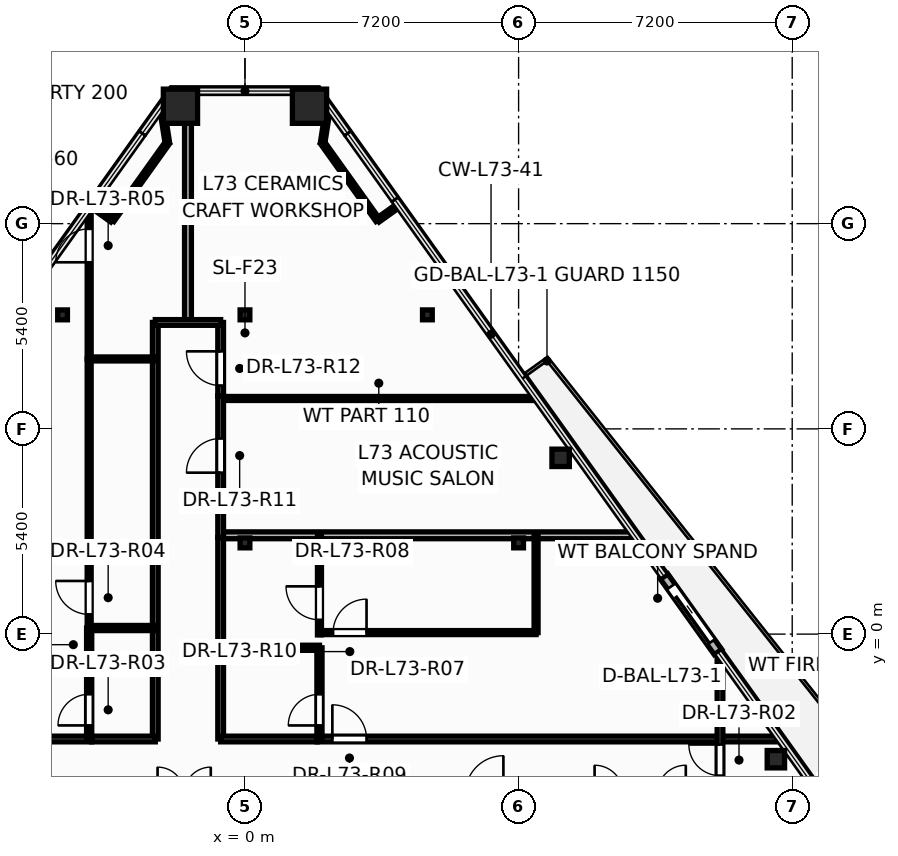
"""IFC4 building model, lengths in metres.
Left out: names, types, materials, properties, quantities, classifications, styles, units other than length and angle.
Written with IfcOpenShell. Run it as: python <this file> out.ifc"""

import sys

from ifc_helpers import new_model, si_unit, direction, frame, frame_2d, origin, origin_2d, place, context, subcontext, project, spatial, rectangle, hollow_rectangle, hollow_circle, i_section, extrude, element, fill, save


model = new_model("IFC4")
c1 = context("Model", 3, precision=1e-05, world=origin(), true_north=direction((0.0, 1.0)))
c2 = subcontext(c1, "Body", "Model", "MODEL_VIEW")
j1 = project(units=[si_unit("LENGTHUNIT", "METRE"), si_unit("PLANEANGLEUNIT", "RADIAN")], contexts=[c1])
p1 = place(None, origin())
s1 = spatial("IfcSite", under=j1, at=p1, CompositionType="ELEMENT")
p2 = place(p1, origin())
s2 = spatial("IfcBuilding", under=s1, at=p2, CompositionType="ELEMENT")
p3 = place(p2, frame((0.0, 0.0, 277.8)))
s3 = spatial("IfcBuildingStorey", under=s2, at=p3, CompositionType="ELEMENT", Elevation=277.8)
for number, where, z_axis, x_axis in (
    (1, (1.698, 13.889, 0.0), (0.0, 0.0, 1.0), (1.0, 0.0, 0.0)),
    (2, (-1.698, 13.889, 0.0), (0.0, 0.0, 1.0), (1.0, 0.0, 0.0)),
):
    element("IfcColumn", number, at=place(p3, frame(where, z_axis=z_axis, x_axis=x_axis)), inside=s3, PredefinedType="COLUMN", context=c2, shape_type="SweptSolid", body=[
        extrude(hollow_rectangle(XDim=0.9, YDim=0.9, WallThickness=0.04, at=origin_2d()), origin(), (0.0, 0.0, 1.0), 3.6),
    ])
for number, where, z_axis, x_axis in (
    (3, (13.97, -3.292, 0.0), (0.0, 0.0, 1.0), (1.0, 0.0, 0.0)),
    (4, (8.306, 4.638, 0.0), (0.0, 0.0, 1.0), (1.0, 0.0, 0.0)),
):
    element("IfcColumn", number, at=place(p3, frame(where, z_axis=z_axis, x_axis=x_axis)), inside=s3, PredefinedType="COLUMN", context=c2, shape_type="SweptSolid", body=[
        extrude(hollow_circle(Radius=0.229, WallThickness=0.016, at=origin_2d()), origin(), (0.0, 0.0, 1.0), 3.6),
    ])
for number, where, z_axis, x_axis in (
    (5, (0.0, 2.4, 0.0), (0.0, 0.0, 1.0), (1.0, 0.0, 0.0)),
    (6, (7.2, 2.4, 0.0), (0.0, 0.0, 1.0), (1.0, 0.0, 0.0)),
    (7, (-4.8, 8.4, 0.0), (0.0, 0.0, 1.0), (1.0, 0.0, 0.0)),
    (8, (0.0, 8.4, 0.0), (0.0, 0.0, 1.0), (1.0, 0.0, 0.0)),
    (9, (4.8, 8.4, 0.0), (0.0, 0.0, 1.0), (1.0, 0.0, 0.0)),
):
    element("IfcColumn", number, at=place(p3, frame(where, z_axis=z_axis, x_axis=x_axis)), inside=s3, PredefinedType="COLUMN", context=c2, shape_type="SweptSolid", body=[
        extrude(i_section(OverallWidth=0.256, OverallDepth=0.26, WebThickness=0.01, FlangeThickness=0.017, at=origin_2d()), origin(), (0.0, 0.0, 1.0), 3.6),
    ])
p4 = place(p3, frame((12.447, -0.471, -0.015), z_axis=(0.0, 0.0, 1.0), x_axis=(-0.581219264245, 0.813746991927, 0.0)))
e10 = element("IfcWall", 10, at=p4, inside=s3, PredefinedType="STANDARD", context=c2, shape_type="SweptSolid", body=[
    extrude(rectangle(XDim=2.44, YDim=0.24, at=frame_2d((1.22, 0.0))), origin(), (0.0, 0.0, 1.0), 2.878),
])
p5 = place(p4, frame((0.32, 0.0, 0.015)))
e11 = element("IfcOpeningElement", 11, at=p5, cuts=e10, PredefinedType="OPENING", context=c2, shape_type="SweptSolid", body=[
    extrude(rectangle(XDim=1.806, YDim=2.204, at=frame_2d((0.9, 1.102))), frame((0.0, 0.13, 0.0), z_axis=(0.0, -1.0, 0.0), x_axis=(1.0, 0.0, 0.0)), (0.0, 0.0, 1.0), 0.26),
])
p6 = place(p3, frame((1.9, -2.76, 0.0), z_axis=(0.0, 0.0, 1.0), x_axis=(1.0, 0.0, 0.0)))
e12 = element("IfcWall", 12, at=p6, inside=s3, PredefinedType="PARTITIONING", context=c2, shape_type="SweptSolid", body=[
    extrude(rectangle(XDim=12.182, YDim=0.15, at=frame_2d((6.091, 0.0))), origin(), (0.0, 0.0, 1.0), 2.32),
])
p7 = place(p6, frame((0.399, 0.0, 0.0)))
e13 = element("IfcOpeningElement", 13, at=p7, cuts=e12, PredefinedType="OPENING", context=c2, shape_type="SweptSolid", body=[
    extrude(rectangle(XDim=0.906, YDim=2.104, at=frame_2d((0.45, 1.052))), frame((0.0, 0.085, 0.0), z_axis=(0.0, -1.0, 0.0), x_axis=(1.0, 0.0, 0.0)), (0.0, 0.0, 1.0), 0.17),
])
p8 = place(p3, frame((-14.082, -2.76, 0.0), z_axis=(0.0, 0.0, 1.0), x_axis=(1.0, 0.0, 0.0)))
e14 = element("IfcWall", 14, at=p8, inside=s3, PredefinedType="PARTITIONING", context=c2, shape_type="SweptSolid", body=[
    extrude(rectangle(XDim=10.042, YDim=0.15, at=frame_2d((5.021, 0.0))), origin(), (0.0, 0.0, 1.0), 2.32),
])
p9 = place(p8, frame((3.214, 0.0, 0.0)))
e15 = element("IfcOpeningElement", 15, at=p9, cuts=e14, PredefinedType="OPENING", context=c2, shape_type="SweptSolid", body=[
    extrude(rectangle(XDim=0.906, YDim=2.104, at=frame_2d((0.45, 1.052))), frame((0.0, 0.085, 0.0), z_axis=(0.0, -1.0, 0.0), x_axis=(1.0, 0.0, 0.0)), (0.0, 0.0, 1.0), 0.17),
])
p10 = place(p3, frame((-0.64, 6.2, 0.0), z_axis=(0.0, 0.0, 1.0), x_axis=(1.0, 0.0, 0.0)))
e16 = element("IfcWall", 16, at=p10, inside=s3, PredefinedType="PARTITIONING", context=c2, shape_type="SweptSolid", body=[
    extrude(rectangle(XDim=8.322, YDim=0.105, at=frame_2d((4.161, 0.0))), origin(), (0.0, 0.0, 1.0), 2.32),
])
p11 = place(p3, frame((-2.36, -2.76, 0.0), z_axis=(0.0, 0.0, 1.0), x_axis=(0.0, 1.0, 0.0)))
e17 = element("IfcWall", 17, at=p11, inside=s3, PredefinedType="PARTITIONING", context=c2, shape_type="SweptSolid", body=[
    extrude(rectangle(XDim=10.96, YDim=0.15, at=frame_2d((5.48, 0.0))), origin(), (0.0, 0.0, 1.0), 2.32),
])
p12 = place(p3, frame((-4.1, 0.16, 0.0), z_axis=(0.0, 0.0, 1.0), x_axis=(0.0, 1.0, 0.0)))
e18 = element("IfcWall", 18, at=p12, inside=s3, PredefinedType="PARTITIONING", context=c2, shape_type="SweptSolid", body=[
    extrude(rectangle(XDim=7.08, YDim=0.105, at=frame_2d((3.54, 0.0))), origin(), (0.0, 0.0, 1.0), 2.32),
])
p13 = place(p12, frame((0.358, 0.0, 0.0)))
e19 = element("IfcOpeningElement", 19, at=p13, cuts=e18, PredefinedType="OPENING", context=c2, shape_type="SweptSolid", body=[
    extrude(rectangle(XDim=0.886, YDim=2.104, at=frame_2d((0.44, 1.052))), frame((0.0, 0.062, 0.0), z_axis=(0.0, -1.0, 0.0), x_axis=(1.0, 0.0, 0.0)), (0.0, 0.0, 1.0), 0.125),
])
p14 = place(p3, frame((-1.5, 8.2, 0.0), z_axis=(0.0, 0.0, 1.0), x_axis=(0.0, 1.0, 0.0)))
e20 = element("IfcWall", 20, at=p14, inside=s3, PredefinedType="PARTITIONING", context=c2, shape_type="SweptSolid", body=[
    extrude(rectangle(XDim=6.09, YDim=0.18, at=frame_2d((3.045, 0.0))), origin(), (0.0, 0.0, 1.0), 2.718),
])
p15 = place(p3, frame((1.96, 0.04, 0.0), z_axis=(0.0, 0.0, 1.0), x_axis=(1.0, 0.0, 0.0)))
e21 = element("IfcWall", 21, at=p15, inside=s3, PredefinedType="PARTITIONING", context=c2, shape_type="SweptSolid", body=[
    extrude(rectangle(XDim=5.7, YDim=0.105, at=frame_2d((2.85, 0.0))), origin(), (0.0, 0.0, 1.0), 2.32),
])
p16 = place(p15, frame((0.359, 0.0, 0.0)))
e22 = element("IfcOpeningElement", 22, at=p16, cuts=e21, PredefinedType="OPENING", context=c2, shape_type="SweptSolid", body=[
    extrude(rectangle(XDim=0.886, YDim=2.104, at=frame_2d((0.44, 1.052))), frame((0.0, 0.062, 0.0), z_axis=(0.0, -1.0, 0.0), x_axis=(1.0, 0.0, 0.0)), (0.0, 0.0, 1.0), 0.125),
])
p17 = place(p3, frame((-0.64, 2.6, 0.0), z_axis=(0.0, 0.0, 1.0), x_axis=(1.0, 0.0, 0.0)))
e23 = element("IfcWall", 23, at=p17, inside=s3, PredefinedType="PARTITIONING", context=c2, shape_type="SweptSolid", body=[
    extrude(rectangle(XDim=10.894, YDim=0.18, at=frame_2d((5.447, 0.0))), origin(), (0.0, 0.0, 1.0), 2.32),
])
p18 = place(p3, frame((-4.1, 7.24, 0.0), z_axis=(0.0, 0.0, 1.0), x_axis=(0.0, 1.0, 0.0)))
e24 = element("IfcWall", 24, at=p18, inside=s3, PredefinedType="PARTITIONING", context=c2, shape_type="SweptSolid", body=[
    extrude(rectangle(XDim=4.24, YDim=0.105, at=frame_2d((2.12, 0.0))), origin(), (0.0, 0.0, 1.0), 2.718),
])
p19 = place(p18, frame((2.543, 0.0, 0.0)))
e25 = element("IfcOpeningElement", 25, at=p19, cuts=e24, PredefinedType="OPENING", context=c2, shape_type="SweptSolid", body=[
    extrude(rectangle(XDim=0.886, YDim=2.104, at=frame_2d((0.44, 1.052))), frame((0.0, 0.062, 0.0), z_axis=(0.0, -1.0, 0.0), x_axis=(1.0, 0.0, 0.0)), (0.0, 0.0, 1.0), 0.125),
])
p20 = place(p3, frame((-0.64, 2.54, 0.0), z_axis=(0.0, 0.0, 1.0), x_axis=(0.0, 1.0, 0.0)))
e26 = element("IfcWall", 26, at=p20, inside=s3, PredefinedType="PARTITIONING", context=c2, shape_type="SweptSolid", body=[
    extrude(rectangle(XDim=3.72, YDim=0.15, at=frame_2d((1.86, 0.0))), origin(), (0.0, 0.0, 1.0), 2.32),
])
p21 = place(p20, frame((1.708, 0.0, 0.0)))
e27 = element("IfcOpeningElement", 27, at=p21, cuts=e26, PredefinedType="OPENING", context=c2, shape_type="SweptSolid", body=[
    extrude(rectangle(XDim=0.906, YDim=2.104, at=frame_2d((0.45, 1.052))), frame((0.0, 0.085, 0.0), z_axis=(0.0, -1.0, 0.0), x_axis=(1.0, 0.0, 0.0)), (0.0, 0.0, 1.0), 0.17),
])
p22 = place(p3, frame((12.5, -4.24, 0.0), z_axis=(0.0, 0.0, 1.0), x_axis=(0.0, 1.0, 0.0)))
e28 = element("IfcWall", 28, at=p22, inside=s3, PredefinedType="PARTITIONING", context=c2, shape_type="SweptSolid", body=[
    extrude(rectangle(XDim=3.695, YDim=0.15, at=frame_2d((1.848, 0.0))), origin(), (0.0, 0.0, 1.0), 2.32),
])
p23 = place(p22, frame((0.516, 0.0, 0.0)))
e29 = element("IfcOpeningElement", 29, at=p23, cuts=e28, PredefinedType="OPENING", context=c2, shape_type="SweptSolid", body=[
    extrude(rectangle(XDim=0.826, YDim=2.104, at=frame_2d((0.41, 1.052))), frame((0.0, 0.085, 0.0), z_axis=(0.0, -1.0, 0.0), x_axis=(1.0, 0.0, 0.0)), (0.0, 0.0, 1.0), 0.17),
])
p24 = place(p3, frame((-0.64, -2.76, 0.0), z_axis=(0.0, 0.0, 1.0), x_axis=(0.0, 1.0, 0.0)))
e30 = element("IfcWall", 30, at=p24, inside=s3, PredefinedType="PARTITIONING", context=c2, shape_type="SweptSolid", body=[
    extrude(rectangle(XDim=5.298, YDim=0.15, at=frame_2d((2.649, 0.0))), origin(), (0.0, 0.0, 1.0), 2.32),
])
p25 = place(p3, frame((-4.1, -2.76, 0.0), z_axis=(0.0, 0.0, 1.0), x_axis=(0.0, 1.0, 0.0)))
e31 = element("IfcWall", 31, at=p25, inside=s3, PredefinedType="PARTITIONING", context=c2, shape_type="SweptSolid", body=[
    extrude(rectangle(XDim=2.92, YDim=0.135, at=frame_2d((1.46, 0.0))), origin(), (0.0, 0.0, 1.0), 3.345),
])
p26 = place(p25, frame((0.357, 0.0, 0.0)))
e32 = element("IfcOpeningElement", 32, at=p26, cuts=e31, PredefinedType="OPENING", context=c2, shape_type="SweptSolid", body=[
    extrude(rectangle(XDim=0.826, YDim=2.104, at=frame_2d((0.41, 1.052))), frame((0.0, 0.078, 0.0), z_axis=(0.0, -1.0, 0.0), x_axis=(1.0, 0.0, 0.0)), (0.0, 0.0, 1.0), 0.155),
])
p27 = place(p3, frame((-0.64, -2.76, 0.0), z_axis=(0.0, 0.0, 1.0), x_axis=(1.0, 0.0, 0.0)))
e33 = element("IfcWall", 33, at=p27, inside=s3, PredefinedType="PARTITIONING", context=c2, shape_type="SweptSolid", body=[
    extrude(rectangle(XDim=2.538, YDim=0.15, at=frame_2d((1.269, 0.0))), origin(), (0.0, 0.0, 1.0), 2.32),
])
p28 = place(p3, frame((1.96, -0.02, 0.0), z_axis=(0.0, 0.0, 1.0), x_axis=(0.0, 1.0, 0.0)))
e34 = element("IfcWall", 34, at=p28, inside=s3, PredefinedType="PARTITIONING", context=c2, shape_type="SweptSolid", body=[
    extrude(rectangle(XDim=2.62, YDim=0.105, at=frame_2d((1.31, 0.0))), origin(), (0.0, 0.0, 1.0), 2.32),
])
p29 = place(p28, frame((0.396, 0.0, 0.0)))
e35 = element("IfcOpeningElement", 35, at=p29, cuts=e34, PredefinedType="OPENING", context=c2, shape_type="SweptSolid", body=[
    extrude(rectangle(XDim=0.886, YDim=2.104, at=frame_2d((0.44, 1.052))), frame((0.0, 0.062, 0.0), z_axis=(0.0, -1.0, 0.0), x_axis=(1.0, 0.0, 0.0)), (0.0, 0.0, 1.0), 0.125),
])
p30 = place(p3, frame((-0.64, -0.36, 0.0), z_axis=(0.0, 0.0, 1.0), x_axis=(1.0, 0.0, 0.0)))
e36 = element("IfcWall", 36, at=p30, inside=s3, PredefinedType="PARTITIONING", context=c2, shape_type="SweptSolid", body=[
    extrude(rectangle(XDim=2.6, YDim=0.135, at=frame_2d((1.3, 0.0))), origin(), (0.0, 0.0, 1.0), 2.32),
])
p31 = place(p3, frame((7.66, 0.04, 0.0), z_axis=(0.0, 0.0, 1.0), x_axis=(0.0, 1.0, 0.0)))
e37 = element("IfcWall", 37, at=p31, inside=s3, PredefinedType="PARTITIONING", context=c2, shape_type="SweptSolid", body=[
    extrude(rectangle(XDim=2.56, YDim=0.105, at=frame_2d((1.28, 0.0))), origin(), (0.0, 0.0, 1.0), 2.718),
])
for number, where, z_axis, x_axis in (
    (38, (-2.043, 12.925, 0.0), (0.0, 0.0, 1.0), (-0.581, -0.814, 0.0)),
    (39, (3.495, 10.892, 0.0), (0.0, 0.0, 1.0), (-0.581, 0.814, 0.0)),
):
    element("IfcWall", number, at=place(p3, frame(where, z_axis=z_axis, x_axis=x_axis)), inside=s3, PredefinedType="PARTITIONING", context=c2, shape_type="SweptSolid", body=[
        extrude(rectangle(XDim=2.498, YDim=0.12, at=frame_2d((1.249, 0.0))), origin(), (0.0, 0.0, 1.0), 2.718),
    ])
p32 = place(p3, frame((1.96, -2.76, 0.0), z_axis=(0.0, 0.0, 1.0), x_axis=(0.0, 1.0, 0.0)))
e40 = element("IfcWall", 40, at=p32, inside=s3, PredefinedType="PARTITIONING", context=c2, shape_type="SweptSolid", body=[
    extrude(rectangle(XDim=2.4, YDim=0.135, at=frame_2d((1.2, 0.0))), origin(), (0.0, 0.0, 1.0), 3.345),
])
p33 = place(p32, frame((0.356, 0.0, 0.0)))
e41 = element("IfcOpeningElement", 41, at=p33, cuts=e40, PredefinedType="OPENING", context=c2, shape_type="SweptSolid", body=[
    extrude(rectangle(XDim=0.826, YDim=2.104, at=frame_2d((0.41, 1.052))), frame((0.0, 0.078, 0.0), z_axis=(0.0, -1.0, 0.0), x_axis=(1.0, 0.0, 0.0)), (0.0, 0.0, 1.0), 0.155),
])
p34 = place(p3, frame((-0.64, 6.262, 0.0), z_axis=(0.0, 0.0, 1.0), x_axis=(0.0, 1.0, 0.0)))
e42 = element("IfcWall", 42, at=p34, inside=s3, PredefinedType="PARTITIONING", context=c2, shape_type="SweptSolid", body=[
    extrude(rectangle(XDim=1.938, YDim=0.15, at=frame_2d((0.969, 0.0))), origin(), (0.0, 0.0, 1.0), 3.345),
])
p35 = place(p34, frame((0.278, 0.0, 0.0)))
e43 = element("IfcOpeningElement", 43, at=p35, cuts=e42, PredefinedType="OPENING", context=c2, shape_type="SweptSolid", body=[
    extrude(rectangle(XDim=0.906, YDim=2.104, at=frame_2d((0.45, 1.052))), frame((0.0, 0.085, 0.0), z_axis=(0.0, -1.0, 0.0), x_axis=(1.0, 0.0, 0.0)), (0.0, 0.0, 1.0), 0.17),
])
p36 = place(p3, frame((-4.038, -2.76, 0.0), z_axis=(0.0, 0.0, 1.0), x_axis=(1.0, 0.0, 0.0)))
e44 = element("IfcWall", 44, at=p36, inside=s3, PredefinedType="PARTITIONING", context=c2, shape_type="SweptSolid", body=[
    extrude(rectangle(XDim=1.678, YDim=0.15, at=frame_2d((0.839, 0.0))), origin(), (0.0, 0.0, 1.0), 2.964),
])
p37 = place(p3, frame((-4.1, 0.16, 0.0), z_axis=(0.0, 0.0, 1.0), x_axis=(1.0, 0.0, 0.0)))
e45 = element("IfcWall", 45, at=p37, inside=s3, PredefinedType="PARTITIONING", context=c2, shape_type="SweptSolid", body=[
    extrude(rectangle(XDim=1.74, YDim=0.135, at=frame_2d((0.87, 0.0))), origin(), (0.0, 0.0, 1.0), 2.964),
])
p38 = place(p3, frame((-4.1, 7.24, 0.0), z_axis=(0.0, 0.0, 1.0), x_axis=(1.0, 0.0, 0.0)))
e46 = element("IfcWall", 46, at=p38, inside=s3, PredefinedType="PARTITIONING", context=c2, shape_type="SweptSolid", body=[
    extrude(rectangle(XDim=1.74, YDim=0.105, at=frame_2d((0.87, 0.0))), origin(), (0.0, 0.0, 1.0), 2.964),
])
p39 = place(p3, frame((-2.36, 8.2, 0.0), z_axis=(0.0, 0.0, 1.0), x_axis=(1.0, 0.0, 0.0)))
e47 = element("IfcWall", 47, at=p39, inside=s3, PredefinedType="PARTITIONING", context=c2, shape_type="SweptSolid", body=[
    extrude(rectangle(XDim=1.72, YDim=0.15, at=frame_2d((0.86, 0.0))), origin(), (0.0, 0.0, 1.0), 2.718),
])
for number, where, z_axis, x_axis in (
    (48, (-2.174, 13.764, 0.0), (0.0, 0.0, 1.0), (0.154, -0.988, 0.0)),
    (49, (2.043, 12.925, 0.0), (0.0, 0.0, 1.0), (0.154, 0.988, 0.0)),
):
    element("IfcWall", number, at=place(p3, frame(where, z_axis=z_axis, x_axis=x_axis)), inside=s3, PredefinedType="PARTITIONING", context=c2, shape_type="SweptSolid", body=[
        extrude(rectangle(XDim=0.85, YDim=0.12, at=frame_2d((0.425, 0.0))), origin(), (0.0, 0.0, 1.0), 2.718),
    ])
for number, where, z_axis, x_axis in (
    (50, (-3.495, 10.892, 0.0), (0.0, 0.0, 1.0), (-0.814, 0.581, 0.0)),
    (51, (4.04, 11.281, 0.0), (0.0, 0.0, 1.0), (-0.814, -0.581, 0.0)),
):
    element("IfcWall", number, at=place(p3, frame(where, z_axis=z_axis, x_axis=x_axis)), inside=s3, PredefinedType="PARTITIONING", context=c2, shape_type="SweptSolid", body=[
        extrude(rectangle(XDim=0.67, YDim=0.12, at=frame_2d((0.335, 0.0))), origin(), (0.0, 0.0, 1.0), 2.718),
    ])
p40 = place(p5, origin())
e52 = element("IfcDoor", 52, at=p40, inside=s3, OperationType="SLIDING_TO_LEFT", PredefinedType="DOOR", context=c2, shape_type="SweptSolid", body=[
    extrude(rectangle(XDim=1.8, YDim=2.2, at=frame_2d((0.9, 1.1))), frame((0.0, 0.025, 0.0), z_axis=(0.0, -1.0, 0.0), x_axis=(1.0, 0.0, 0.0)), (0.0, 0.0, 1.0), 0.05),
])
fill(e11, e52)
p41 = place(p23, origin())
e53 = element("IfcDoor", 53, at=p41, inside=s3, OperationType="SINGLE_SWING_RIGHT", PredefinedType="DOOR", context=c2, shape_type="SweptSolid", body=[
    extrude(rectangle(XDim=0.82, YDim=2.1, at=frame_2d((0.41, 1.05))), frame((0.0, 0.025, 0.0), z_axis=(0.0, -1.0, 0.0), x_axis=(1.0, 0.0, 0.0)), (0.0, 0.0, 1.0), 0.05),
])
fill(e29, e53)
p42 = place(p26, origin())
e54 = element("IfcDoor", 54, at=p42, inside=s3, OperationType="SINGLE_SWING_LEFT", PredefinedType="DOOR", context=c2, shape_type="SweptSolid", body=[
    extrude(rectangle(XDim=0.82, YDim=2.1, at=frame_2d((0.41, 1.05))), frame((0.0, 0.025, 0.0), z_axis=(0.0, -1.0, 0.0), x_axis=(1.0, 0.0, 0.0)), (0.0, 0.0, 1.0), 0.05),
])
fill(e32, e54)
p43 = place(p13, origin())
e55 = element("IfcDoor", 55, at=p43, inside=s3, OperationType="SINGLE_SWING_RIGHT", PredefinedType="DOOR", context=c2, shape_type="SweptSolid", body=[
    extrude(rectangle(XDim=0.88, YDim=2.1, at=frame_2d((0.44, 1.05))), frame((0.0, 0.025, 0.0), z_axis=(0.0, -1.0, 0.0), x_axis=(1.0, 0.0, 0.0)), (0.0, 0.0, 1.0), 0.05),
])
fill(e19, e55)
p44 = place(p19, origin())
e56 = element("IfcDoor", 56, at=p44, inside=s3, OperationType="SINGLE_SWING_LEFT", PredefinedType="DOOR", context=c2, shape_type="SweptSolid", body=[
    extrude(rectangle(XDim=0.88, YDim=2.1, at=frame_2d((0.44, 1.05))), frame((0.0, 0.025, 0.0), z_axis=(0.0, -1.0, 0.0), x_axis=(1.0, 0.0, 0.0)), (0.0, 0.0, 1.0), 0.05),
])
fill(e25, e56)
p45 = place(p33, origin())
e57 = element("IfcDoor", 57, at=p45, inside=s3, OperationType="SINGLE_SWING_LEFT", PredefinedType="DOOR", context=c2, shape_type="SweptSolid", body=[
    extrude(rectangle(XDim=0.82, YDim=2.1, at=frame_2d((0.41, 1.05))), frame((0.0, 0.025, 0.0), z_axis=(0.0, -1.0, 0.0), x_axis=(1.0, 0.0, 0.0)), (0.0, 0.0, 1.0), 0.05),
])
fill(e41, e57)
p46 = place(p29, origin())
e58 = element("IfcDoor", 58, at=p46, inside=s3, OperationType="SINGLE_SWING_RIGHT", PredefinedType="DOOR", context=c2, shape_type="SweptSolid", body=[
    extrude(rectangle(XDim=0.88, YDim=2.1, at=frame_2d((0.44, 1.05))), frame((0.0, 0.025, 0.0), z_axis=(0.0, -1.0, 0.0), x_axis=(1.0, 0.0, 0.0)), (0.0, 0.0, 1.0), 0.05),
])
fill(e35, e58)
p47 = place(p7, origin())
e59 = element("IfcDoor", 59, at=p47, inside=s3, OperationType="SINGLE_SWING_LEFT", PredefinedType="DOOR", context=c2, shape_type="SweptSolid", body=[
    extrude(rectangle(XDim=0.9, YDim=2.1, at=frame_2d((0.45, 1.05))), frame((0.0, 0.025, 0.0), z_axis=(0.0, -1.0, 0.0), x_axis=(1.0, 0.0, 0.0)), (0.0, 0.0, 1.0), 0.05),
])
fill(e13, e59)
p48 = place(p16, origin())
e60 = element("IfcDoor", 60, at=p48, inside=s3, OperationType="SINGLE_SWING_RIGHT", PredefinedType="DOOR", context=c2, shape_type="SweptSolid", body=[
    extrude(rectangle(XDim=0.88, YDim=2.1, at=frame_2d((0.44, 1.05))), frame((0.0, 0.025, 0.0), z_axis=(0.0, -1.0, 0.0), x_axis=(1.0, 0.0, 0.0)), (0.0, 0.0, 1.0), 0.05),
])
fill(e22, e60)
p49 = place(p21, origin())
e61 = element("IfcDoor", 61, at=p49, inside=s3, OperationType="SINGLE_SWING_LEFT", PredefinedType="DOOR", context=c2, shape_type="SweptSolid", body=[
    extrude(rectangle(XDim=0.9, YDim=2.1, at=frame_2d((0.45, 1.05))), frame((0.0, 0.025, 0.0), z_axis=(0.0, -1.0, 0.0), x_axis=(1.0, 0.0, 0.0)), (0.0, 0.0, 1.0), 0.05),
])
fill(e27, e61)
p50 = place(p35, origin())
e62 = element("IfcDoor", 62, at=p50, inside=s3, OperationType="SINGLE_SWING_RIGHT", PredefinedType="DOOR", context=c2, shape_type="SweptSolid", body=[
    extrude(rectangle(XDim=0.9, YDim=2.1, at=frame_2d((0.45, 1.05))), frame((0.0, 0.025, 0.0), z_axis=(0.0, -1.0, 0.0), x_axis=(1.0, 0.0, 0.0)), (0.0, 0.0, 1.0), 0.05),
])
fill(e43, e62)
save(model, sys.argv[1])
